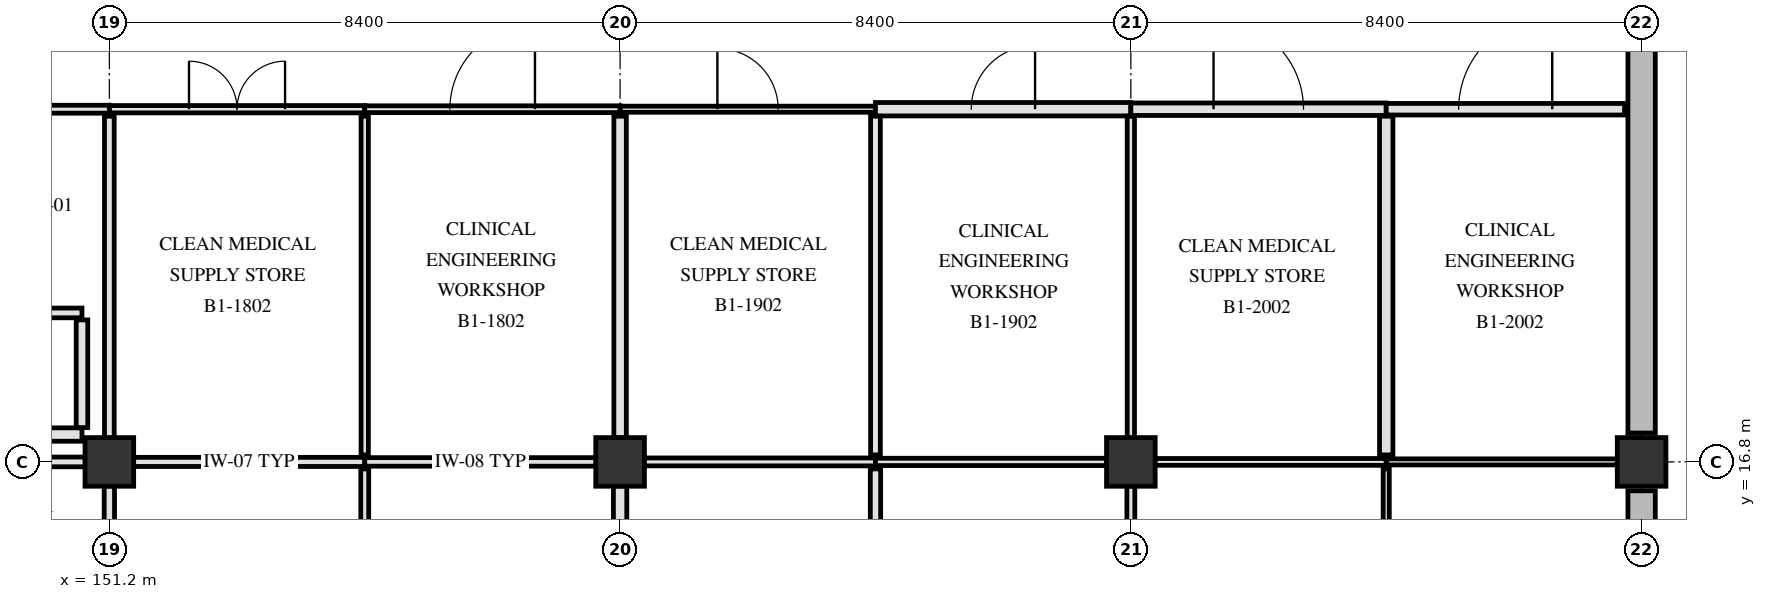
"""IFC4 building model, lengths in metres.
Left out: names, types, materials, properties, quantities, classifications, styles, units other than length and angle.
Written with IfcOpenShell. Run it as: python <this file> out.ifc"""

import sys

from ifc_helpers import new_model, si_unit, direction, frame, frame_2d, origin, origin_2d, place, context, subcontext, project, spatial, rectangle, extrude, element, fill, save


model = new_model("IFC4")
c1 = context("Model", 3, precision=1e-05, world=origin(), true_north=direction((0.0, 1.0)))
c2 = subcontext(c1, "Body", "Model", "MODEL_VIEW")
j1 = project(units=[si_unit("LENGTHUNIT", "METRE"), si_unit("PLANEANGLEUNIT", "RADIAN")], contexts=[c1])
p1 = place(None, origin())
s1 = spatial("IfcSite", under=j1, at=p1, CompositionType="ELEMENT")
p2 = place(p1, origin())
s2 = spatial("IfcBuilding", under=s1, at=p2, CompositionType="ELEMENT")
p3 = place(p2, frame((0.0, 0.0, -5.4)))
s3 = spatial("IfcBuildingStorey", under=s2, at=p3, CompositionType="ELEMENT", Elevation=-5.4)
for number, where, z_axis, x_axis in (
    (1, (151.2, 16.8, 0.0), (0.0, 0.0, 1.0), (1.0, 0.0, 0.0)),
    (2, (159.6, 16.8, 0.0), (0.0, 0.0, 1.0), (1.0, 0.0, 0.0)),
    (3, (168.0, 16.8, 0.0), (0.0, 0.0, 1.0), (1.0, 0.0, 0.0)),
    (4, (176.4, 16.8, 0.0), (0.0, 0.0, 1.0), (1.0, 0.0, 0.0)),
):
    element("IfcColumn", number, at=place(p3, frame(where, z_axis=z_axis, x_axis=x_axis)), inside=s3, PredefinedType="COLUMN", context=c2, shape_type="SweptSolid", body=[
        extrude(rectangle(XDim=0.8, YDim=0.8, at=origin_2d()), origin(), (0.0, 0.0, 1.0), 5.4),
    ])
p4 = place(p3, frame((176.4, 24.725, 0.0), z_axis=(0.0, 0.0, 1.0), x_axis=(0.0, -1.0, 0.0)))
e5 = element("IfcWall", 5, at=p4, inside=s3, PredefinedType="SOLIDWALL", context=c2, shape_type="SweptSolid", body=[
    extrude(rectangle(XDim=7.45, YDim=0.45, at=frame_2d((3.725, 0.0))), origin(), (0.0, 0.0, 1.0), 5.08),
])
p5 = place(p3, frame((176.4, 16.325, 0.0), z_axis=(0.0, 0.0, 1.0), x_axis=(0.0, -1.0, 0.0)))
e6 = element("IfcWall", 6, at=p5, inside=s3, PredefinedType="SOLIDWALL", context=c2, shape_type="SweptSolid", body=[
    extrude(rectangle(XDim=7.45, YDim=0.45, at=frame_2d((3.725, 0.0))), origin(), (0.0, 0.0, 1.0), 5.08),
])
p6 = place(p3, frame((147.0, 16.8, 0.0), z_axis=(0.0, 0.0, 1.0), x_axis=(1.0, 0.0, 0.0)))
e7 = element("IfcWall", 7, at=p6, inside=s3, PredefinedType="PARTITIONING", context=c2, shape_type="SweptSolid", body=[
    extrude(rectangle(XDim=3.805, YDim=0.16, at=frame_2d((1.902, 0.0))), origin(), (0.0, 0.0, 1.0), 4.42),
])
p7 = place(p3, frame((151.595, 16.8, 0.0), z_axis=(0.0, 0.0, 1.0), x_axis=(1.0, 0.0, 0.0)))
e8 = element("IfcWall", 8, at=p7, inside=s3, PredefinedType="PARTITIONING", context=c2, shape_type="SweptSolid", body=[
    extrude(rectangle(XDim=3.805, YDim=0.15, at=frame_2d((1.902, 0.0))), origin(), (0.0, 0.0, 1.0), 4.42),
])
p8 = place(p3, frame((155.4, 16.8, 0.0), z_axis=(0.0, 0.0, 1.0), x_axis=(1.0, 0.0, 0.0)))
e9 = element("IfcWall", 9, at=p8, inside=s3, PredefinedType="PARTITIONING", context=c2, shape_type="SweptSolid", body=[
    extrude(rectangle(XDim=3.805, YDim=0.14, at=frame_2d((1.903, 0.0))), origin(), (0.0, 0.0, 1.0), 4.42),
])
p9 = place(p3, frame((159.995, 16.8, 0.0), z_axis=(0.0, 0.0, 1.0), x_axis=(1.0, 0.0, 0.0)))
e10 = element("IfcWall", 10, at=p9, inside=s3, PredefinedType="PARTITIONING", context=c2, shape_type="SweptSolid", body=[
    extrude(rectangle(XDim=3.805, YDim=0.13, at=frame_2d((1.902, 0.0))), origin(), (0.0, 0.0, 1.0), 4.42),
])
p10 = place(p3, frame((163.8, 16.8, 0.0), z_axis=(0.0, 0.0, 1.0), x_axis=(1.0, 0.0, 0.0)))
e11 = element("IfcWall", 11, at=p10, inside=s3, PredefinedType="PARTITIONING", context=c2, shape_type="SweptSolid", body=[
    extrude(rectangle(XDim=3.805, YDim=0.12, at=frame_2d((1.902, 0.0))), origin(), (0.0, 0.0, 1.0), 4.42),
])
p11 = place(p3, frame((168.395, 16.8, 0.0), z_axis=(0.0, 0.0, 1.0), x_axis=(1.0, 0.0, 0.0)))
e12 = element("IfcWall", 12, at=p11, inside=s3, PredefinedType="PARTITIONING", context=c2, shape_type="SweptSolid", body=[
    extrude(rectangle(XDim=3.805, YDim=0.112, at=frame_2d((1.902, 0.0))), origin(), (0.0, 0.0, 1.0), 4.42),
])
p12 = place(p3, frame((172.2, 16.8, 0.0), z_axis=(0.0, 0.0, 1.0), x_axis=(1.0, 0.0, 0.0)))
e13 = element("IfcWall", 13, at=p12, inside=s3, PredefinedType="PARTITIONING", context=c2, shape_type="SweptSolid", body=[
    extrude(rectangle(XDim=3.805, YDim=0.1, at=frame_2d((1.902, 0.0))), origin(), (0.0, 0.0, 1.0), 4.42),
])
p13 = place(p3, frame((147.0, 17.25, 0.0), z_axis=(0.0, 0.0, 1.0), x_axis=(1.0, 0.0, 0.0)))
e14 = element("IfcWall", 14, at=p13, inside=s3, PredefinedType="PARTITIONING", context=c2, shape_type="SweptSolid", body=[
    extrude(rectangle(XDim=3.75, YDim=0.22, at=frame_2d((1.875, 0.0))), origin(), (0.0, 0.0, 1.0), 5.07),
])
p14 = place(p3, frame((147.0, 19.25, 0.0), z_axis=(0.0, 0.0, 1.0), x_axis=(1.0, 0.0, 0.0)))
e15 = element("IfcWall", 15, at=p14, inside=s3, PredefinedType="PARTITIONING", context=c2, shape_type="SweptSolid", body=[
    extrude(rectangle(XDim=3.75, YDim=0.16, at=frame_2d((1.875, 0.0))), origin(), (0.0, 0.0, 1.0), 5.07),
])
p15 = place(p14, frame((1.215, 0.0, 0.0)))
e16 = element("IfcOpeningElement", 16, at=p15, cuts=e15, PredefinedType="OPENING", context=c2, shape_type="SweptSolid", body=[
    extrude(rectangle(XDim=1.32, YDim=2.18, at=frame_2d((0.66, 1.09))), frame((0.0, 0.09, 0.0), z_axis=(0.0, -1.0, 0.0), x_axis=(1.0, 0.0, 0.0)), (0.0, 0.0, 1.0), 0.18),
])
p16 = place(p3, frame((147.0, 22.6, 0.0), z_axis=(0.0, 0.0, 1.0), x_axis=(1.0, 0.0, 0.0)))
e17 = element("IfcWall", 17, at=p16, inside=s3, PredefinedType="PARTITIONING", context=c2, shape_type="SweptSolid", body=[
    extrude(rectangle(XDim=4.2, YDim=0.13, at=frame_2d((2.1, 0.0))), origin(), (0.0, 0.0, 1.0), 4.47),
])
p17 = place(p3, frame((151.2, 22.6, 0.0), z_axis=(0.0, 0.0, 1.0), x_axis=(1.0, 0.0, 0.0)))
e18 = element("IfcWall", 18, at=p17, inside=s3, PredefinedType="PARTITIONING", context=c2, shape_type="SweptSolid", body=[
    extrude(rectangle(XDim=4.2, YDim=0.12, at=frame_2d((2.1, 0.0))), origin(), (0.0, 0.0, 1.0), 4.47),
])
p18 = place(p17, frame((1.31, 0.0, 0.0)))
e19 = element("IfcOpeningElement", 19, at=p18, cuts=e18, PredefinedType="OPENING", context=c2, shape_type="SweptSolid", body=[
    extrude(rectangle(XDim=1.58, YDim=2.22, at=frame_2d((0.79, 1.11))), frame((0.0, 0.07, 0.0), z_axis=(0.0, -1.0, 0.0), x_axis=(1.0, 0.0, 0.0)), (0.0, 0.0, 1.0), 0.14),
])
p19 = place(p3, frame((155.4, 22.6, 0.0), z_axis=(0.0, 0.0, 1.0), x_axis=(1.0, 0.0, 0.0)))
e20 = element("IfcWall", 20, at=p19, inside=s3, PredefinedType="PARTITIONING", context=c2, shape_type="SweptSolid", body=[
    extrude(rectangle(XDim=4.2, YDim=0.112, at=frame_2d((2.1, 0.0))), origin(), (0.0, 0.0, 1.0), 4.47),
])
p20 = place(p19, frame((1.4, 0.0, 0.0)))
e21 = element("IfcOpeningElement", 21, at=p20, cuts=e20, PredefinedType="OPENING", context=c2, shape_type="SweptSolid", body=[
    extrude(rectangle(XDim=1.4, YDim=2.2, at=frame_2d((0.7, 1.1))), frame((0.0, 0.066, 0.0), z_axis=(0.0, -1.0, 0.0), x_axis=(1.0, 0.0, 0.0)), (0.0, 0.0, 1.0), 0.132),
])
p21 = place(p3, frame((159.6, 22.6, 0.0), z_axis=(0.0, 0.0, 1.0), x_axis=(1.0, 0.0, 0.0)))
e22 = element("IfcWall", 22, at=p21, inside=s3, PredefinedType="PARTITIONING", context=c2, shape_type="SweptSolid", body=[
    extrude(rectangle(XDim=4.2, YDim=0.1, at=frame_2d((2.1, 0.0))), origin(), (0.0, 0.0, 1.0), 4.47),
])
p22 = place(p21, frame((1.6, 0.0, 0.0)))
e23 = element("IfcOpeningElement", 23, at=p22, cuts=e22, PredefinedType="OPENING", context=c2, shape_type="SweptSolid", body=[
    extrude(rectangle(XDim=1.0, YDim=2.15, at=frame_2d((0.5, 1.075))), frame((0.0, 0.06, 0.0), z_axis=(0.0, -1.0, 0.0), x_axis=(1.0, 0.0, 0.0)), (0.0, 0.0, 1.0), 0.12),
])
p23 = place(p3, frame((163.8, 22.6, 0.0), z_axis=(0.0, 0.0, 1.0), x_axis=(1.0, 0.0, 0.0)))
e24 = element("IfcWall", 24, at=p23, inside=s3, PredefinedType="PARTITIONING", context=c2, shape_type="SweptSolid", body=[
    extrude(rectangle(XDim=4.2, YDim=0.22, at=frame_2d((2.1, 0.0))), origin(), (0.0, 0.0, 1.0), 4.47),
])
p24 = place(p23, frame((1.575, 0.0, 0.0)))
e25 = element("IfcOpeningElement", 25, at=p24, cuts=e24, PredefinedType="OPENING", context=c2, shape_type="SweptSolid", body=[
    extrude(rectangle(XDim=1.05, YDim=2.15, at=frame_2d((0.525, 1.075))), frame((0.0, 0.12, 0.0), z_axis=(0.0, -1.0, 0.0), x_axis=(1.0, 0.0, 0.0)), (0.0, 0.0, 1.0), 0.24),
])
p25 = place(p3, frame((168.0, 22.6, 0.0), z_axis=(0.0, 0.0, 1.0), x_axis=(1.0, 0.0, 0.0)))
e26 = element("IfcWall", 26, at=p25, inside=s3, PredefinedType="PARTITIONING", context=c2, shape_type="SweptSolid", body=[
    extrude(rectangle(XDim=4.2, YDim=0.205, at=frame_2d((2.1, 0.0))), origin(), (0.0, 0.0, 1.0), 4.47),
])
p26 = place(p25, frame((1.36, 0.0, 0.0)))
e27 = element("IfcOpeningElement", 27, at=p26, cuts=e26, PredefinedType="OPENING", context=c2, shape_type="SweptSolid", body=[
    extrude(rectangle(XDim=1.48, YDim=2.22, at=frame_2d((0.74, 1.11))), frame((0.0, 0.113, 0.0), z_axis=(0.0, -1.0, 0.0), x_axis=(1.0, 0.0, 0.0)), (0.0, 0.0, 1.0), 0.225),
])
p27 = place(p3, frame((172.2, 22.6, 0.0), z_axis=(0.0, 0.0, 1.0), x_axis=(1.0, 0.0, 0.0)))
e28 = element("IfcWall", 28, at=p27, inside=s3, PredefinedType="PARTITIONING", context=c2, shape_type="SweptSolid", body=[
    extrude(rectangle(XDim=3.92, YDim=0.19, at=frame_2d((1.96, 0.0))), origin(), (0.0, 0.0, 1.0), 5.07),
])
p28 = place(p27, frame((1.19, 0.0, 0.0)))
e29 = element("IfcOpeningElement", 29, at=p28, cuts=e28, PredefinedType="OPENING", context=c2, shape_type="SweptSolid", body=[
    extrude(rectangle(XDim=1.54, YDim=2.24, at=frame_2d((0.77, 1.12))), frame((0.0, 0.105, 0.0), z_axis=(0.0, -1.0, 0.0), x_axis=(1.0, 0.0, 0.0)), (0.0, 0.0, 1.0), 0.21),
])
p29 = place(p3, frame((150.75, 17.365, 0.0), z_axis=(0.0, 0.0, 1.0), x_axis=(0.0, 1.0, 0.0)))
e30 = element("IfcWall", 30, at=p29, inside=s3, PredefinedType="PARTITIONING", context=c2, shape_type="SweptSolid", body=[
    extrude(rectangle(XDim=1.77, YDim=0.19, at=frame_2d((0.885, 0.0))), origin(), (0.0, 0.0, 1.0), 5.07),
])
p30 = place(p3, frame((151.2, 12.1, 0.0), z_axis=(0.0, 0.0, 1.0), x_axis=(0.0, 1.0, 0.0)))
e31 = element("IfcWall", 31, at=p30, inside=s3, PredefinedType="PARTITIONING", context=c2, shape_type="SweptSolid", body=[
    extrude(rectangle(XDim=4.305, YDim=0.17, at=frame_2d((2.152, 0.0))), origin(), (0.0, 0.0, 1.0), 4.47),
])
p31 = place(p3, frame((151.2, 17.195, 0.0), z_axis=(0.0, 0.0, 1.0), x_axis=(0.0, 1.0, 0.0)))
e32 = element("IfcWall", 32, at=p31, inside=s3, PredefinedType="PARTITIONING", context=c2, shape_type="SweptSolid", body=[
    extrude(rectangle(XDim=5.29, YDim=0.16, at=frame_2d((2.645, 0.0))), origin(), (0.0, 0.0, 1.0), 4.47),
])
p32 = place(p3, frame((155.4, 11.115, 0.0), z_axis=(0.0, 0.0, 1.0), x_axis=(0.0, 1.0, 0.0)))
e33 = element("IfcWall", 33, at=p32, inside=s3, PredefinedType="PARTITIONING", context=c2, shape_type="SweptSolid", body=[
    extrude(rectangle(XDim=5.57, YDim=0.13, at=frame_2d((2.785, 0.0))), origin(), (0.0, 0.0, 1.0), 4.42),
])
p33 = place(p3, frame((155.4, 16.915, 0.0), z_axis=(0.0, 0.0, 1.0), x_axis=(0.0, 1.0, 0.0)))
e34 = element("IfcWall", 34, at=p33, inside=s3, PredefinedType="PARTITIONING", context=c2, shape_type="SweptSolid", body=[
    extrude(rectangle(XDim=5.57, YDim=0.12, at=frame_2d((2.785, 0.0))), origin(), (0.0, 0.0, 1.0), 4.42),
])
p34 = place(p3, frame((159.6, 11.115, 0.0), z_axis=(0.0, 0.0, 1.0), x_axis=(0.0, 1.0, 0.0)))
e35 = element("IfcWall", 35, at=p34, inside=s3, PredefinedType="PARTITIONING", context=c2, shape_type="SweptSolid", body=[
    extrude(rectangle(XDim=5.29, YDim=0.22, at=frame_2d((2.645, 0.0))), origin(), (0.0, 0.0, 1.0), 4.47),
])
p35 = place(p3, frame((159.6, 17.195, 0.0), z_axis=(0.0, 0.0, 1.0), x_axis=(0.0, 1.0, 0.0)))
e36 = element("IfcWall", 36, at=p35, inside=s3, PredefinedType="PARTITIONING", context=c2, shape_type="SweptSolid", body=[
    extrude(rectangle(XDim=5.29, YDim=0.205, at=frame_2d((2.645, 0.0))), origin(), (0.0, 0.0, 1.0), 4.47),
])
p36 = place(p3, frame((163.8, 11.115, 0.0), z_axis=(0.0, 0.0, 1.0), x_axis=(0.0, 1.0, 0.0)))
e37 = element("IfcWall", 37, at=p36, inside=s3, PredefinedType="PARTITIONING", context=c2, shape_type="SweptSolid", body=[
    extrude(rectangle(XDim=5.57, YDim=0.17, at=frame_2d((2.785, 0.0))), origin(), (0.0, 0.0, 1.0), 4.42),
])
p37 = place(p3, frame((163.8, 16.915, 0.0), z_axis=(0.0, 0.0, 1.0), x_axis=(0.0, 1.0, 0.0)))
e38 = element("IfcWall", 38, at=p37, inside=s3, PredefinedType="PARTITIONING", context=c2, shape_type="SweptSolid", body=[
    extrude(rectangle(XDim=5.57, YDim=0.16, at=frame_2d((2.785, 0.0))), origin(), (0.0, 0.0, 1.0), 4.42),
])
p38 = place(p3, frame((168.0, 11.115, 0.0), z_axis=(0.0, 0.0, 1.0), x_axis=(0.0, 1.0, 0.0)))
e39 = element("IfcWall", 39, at=p38, inside=s3, PredefinedType="PARTITIONING", context=c2, shape_type="SweptSolid", body=[
    extrude(rectangle(XDim=5.29, YDim=0.13, at=frame_2d((2.645, 0.0))), origin(), (0.0, 0.0, 1.0), 4.47),
])
p39 = place(p3, frame((168.0, 17.195, 0.0), z_axis=(0.0, 0.0, 1.0), x_axis=(0.0, 1.0, 0.0)))
e40 = element("IfcWall", 40, at=p39, inside=s3, PredefinedType="PARTITIONING", context=c2, shape_type="SweptSolid", body=[
    extrude(rectangle(XDim=5.29, YDim=0.12, at=frame_2d((2.645, 0.0))), origin(), (0.0, 0.0, 1.0), 4.47),
])
p40 = place(p3, frame((172.2, 11.115, 0.0), z_axis=(0.0, 0.0, 1.0), x_axis=(0.0, 1.0, 0.0)))
e41 = element("IfcWall", 41, at=p40, inside=s3, PredefinedType="PARTITIONING", context=c2, shape_type="SweptSolid", body=[
    extrude(rectangle(XDim=5.57, YDim=0.1, at=frame_2d((2.785, 0.0))), origin(), (0.0, 0.0, 1.0), 4.42),
])
p41 = place(p3, frame((172.2, 16.915, 0.0), z_axis=(0.0, 0.0, 1.0), x_axis=(0.0, 1.0, 0.0)))
e42 = element("IfcWall", 42, at=p41, inside=s3, PredefinedType="PARTITIONING", context=c2, shape_type="SweptSolid", body=[
    extrude(rectangle(XDim=5.57, YDim=0.22, at=frame_2d((2.785, 0.0))), origin(), (0.0, 0.0, 1.0), 4.42),
])
p42 = place(p18, origin())
e43 = element("IfcDoor", 43, at=p42, inside=s3, OperationType="DOUBLE_SWING_LEFT", PredefinedType="DOOR", context=c2, shape_type="SweptSolid", body=[
    extrude(rectangle(XDim=1.58, YDim=2.22, at=frame_2d((0.79, 1.11))), frame((0.0, 0.025, 0.0), z_axis=(0.0, -1.0, 0.0), x_axis=(1.0, 0.0, 0.0)), (0.0, 0.0, 1.0), 0.05),
])
fill(e19, e43)
p43 = place(p20, origin())
e44 = element("IfcDoor", 44, at=p43, inside=s3, OperationType="SINGLE_SWING_RIGHT", PredefinedType="DOOR", context=c2, shape_type="SweptSolid", body=[
    extrude(rectangle(XDim=1.4, YDim=2.2, at=frame_2d((0.7, 1.1))), frame((0.0, 0.025, 0.0), z_axis=(0.0, -1.0, 0.0), x_axis=(1.0, 0.0, 0.0)), (0.0, 0.0, 1.0), 0.05),
])
fill(e21, e44)
p44 = place(p22, origin())
e45 = element("IfcDoor", 45, at=p44, inside=s3, OperationType="SINGLE_SWING_LEFT", PredefinedType="DOOR", context=c2, shape_type="SweptSolid", body=[
    extrude(rectangle(XDim=1.0, YDim=2.15, at=frame_2d((0.5, 1.075))), frame((0.0, 0.025, 0.0), z_axis=(0.0, -1.0, 0.0), x_axis=(1.0, 0.0, 0.0)), (0.0, 0.0, 1.0), 0.05),
])
fill(e23, e45)
p45 = place(p24, origin())
e46 = element("IfcDoor", 46, at=p45, inside=s3, OperationType="SINGLE_SWING_RIGHT", PredefinedType="DOOR", context=c2, shape_type="SweptSolid", body=[
    extrude(rectangle(XDim=1.05, YDim=2.15, at=frame_2d((0.525, 1.075))), frame((0.0, 0.025, 0.0), z_axis=(0.0, -1.0, 0.0), x_axis=(1.0, 0.0, 0.0)), (0.0, 0.0, 1.0), 0.05),
])
fill(e25, e46)
p46 = place(p26, origin())
e47 = element("IfcDoor", 47, at=p46, inside=s3, OperationType="SINGLE_SWING_LEFT", PredefinedType="DOOR", context=c2, shape_type="SweptSolid", body=[
    extrude(rectangle(XDim=1.48, YDim=2.22, at=frame_2d((0.74, 1.11))), frame((0.0, 0.025, 0.0), z_axis=(0.0, -1.0, 0.0), x_axis=(1.0, 0.0, 0.0)), (0.0, 0.0, 1.0), 0.05),
])
fill(e27, e47)
p47 = place(p28, origin())
e48 = element("IfcDoor", 48, at=p47, inside=s3, OperationType="SINGLE_SWING_RIGHT", PredefinedType="DOOR", context=c2, shape_type="SweptSolid", body=[
    extrude(rectangle(XDim=1.54, YDim=2.24, at=frame_2d((0.77, 1.12))), frame((0.0, 0.025, 0.0), z_axis=(0.0, -1.0, 0.0), x_axis=(1.0, 0.0, 0.0)), (0.0, 0.0, 1.0), 0.05),
])
fill(e29, e48)
save(model, sys.argv[1])
